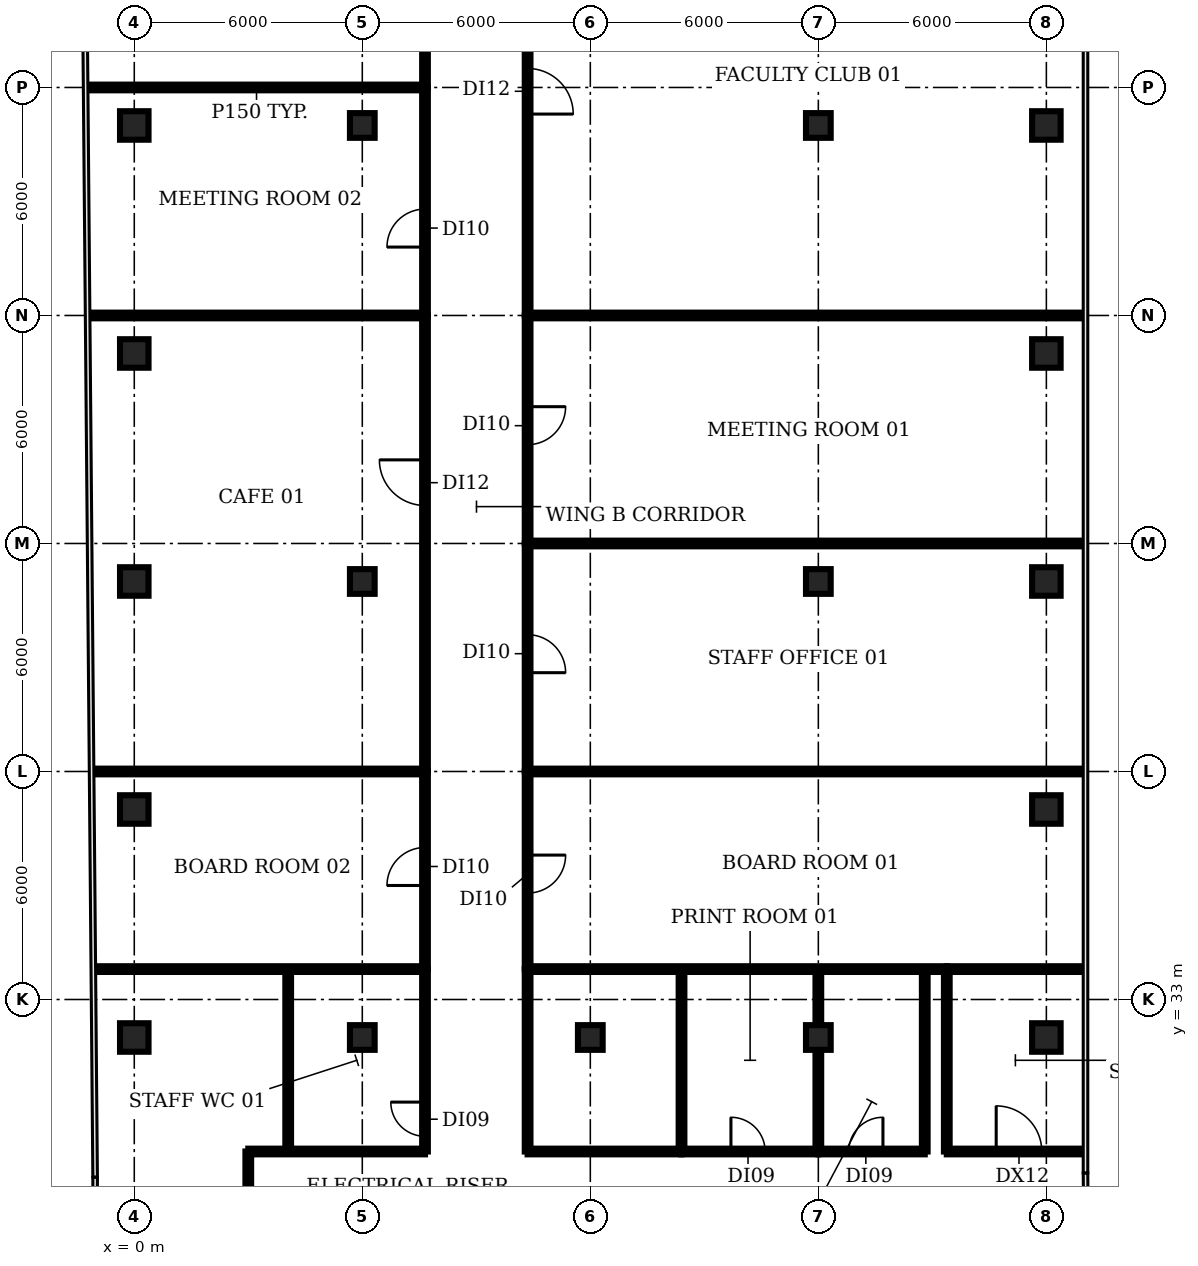
"""IFC4 building model, lengths in metres.
Left out: names, types, materials, properties, quantities, classifications, styles, units other than length and angle.
Written with IfcOpenShell. Run it as: python <this file> out.ifc"""

import sys

from ifc_helpers import new_model, si_unit, direction, frame, frame_2d, origin, origin_2d, place, context, subcontext, project, spatial, rectangle, extrude, element, fill, save


model = new_model("IFC4")
c1 = context("Model", 3, precision=1e-05, world=origin(), true_north=direction((0.0, 1.0)))
c2 = subcontext(c1, "Body", "Model", "MODEL_VIEW")
j1 = project(units=[si_unit("LENGTHUNIT", "METRE"), si_unit("PLANEANGLEUNIT", "RADIAN")], contexts=[c1])
p1 = place(None, origin())
s1 = spatial("IfcSite", under=j1, at=p1, CompositionType="ELEMENT")
p2 = place(p1, origin())
s2 = spatial("IfcBuilding", under=s1, at=p2, CompositionType="ELEMENT")
p3 = place(p2, frame((0.0, 0.0, 289.4)))
s3 = spatial("IfcBuildingStorey", under=s2, at=p3, CompositionType="ELEMENT", Elevation=289.4)
for number, where, z_axis, x_axis in (
    (1, (0.0, 32.0, 0.0), (0.0, 0.0, 1.0), (1.0, 0.0, 0.0)),
    (2, (0.0, 38.0, 0.0), (0.0, 0.0, 1.0), (1.0, 0.0, 0.0)),
    (3, (0.0, 44.0, 0.0), (0.0, 0.0, 1.0), (1.0, 0.0, 0.0)),
    (4, (0.0, 50.0, 0.0), (0.0, 0.0, 1.0), (1.0, 0.0, 0.0)),
    (5, (0.0, 56.0, 0.0), (0.0, 0.0, 1.0), (1.0, 0.0, 0.0)),
):
    element("IfcColumn", number, at=place(p3, frame(where, z_axis=z_axis, x_axis=x_axis)), inside=s3, PredefinedType="COLUMN", context=c2, shape_type="SweptSolid", body=[
        extrude(rectangle(XDim=0.75, YDim=0.75, at=origin_2d()), origin(), (0.0, 0.0, 1.0), 3.85),
    ])
for number, where, z_axis, x_axis in (
    (6, (6.0, 32.0, 0.0), (0.0, 0.0, 1.0), (1.0, 0.0, 0.0)),
    (7, (6.0, 44.0, 0.0), (0.0, 0.0, 1.0), (1.0, 0.0, 0.0)),
    (8, (6.0, 56.0, 0.0), (0.0, 0.0, 1.0), (1.0, 0.0, 0.0)),
    (9, (12.0, 32.0, 0.0), (0.0, 0.0, 1.0), (1.0, 0.0, 0.0)),
    (10, (18.0, 32.0, 0.0), (0.0, 0.0, 1.0), (1.0, 0.0, 0.0)),
    (11, (18.0, 44.0, 0.0), (0.0, 0.0, 1.0), (1.0, 0.0, 0.0)),
    (12, (18.0, 56.0, 0.0), (0.0, 0.0, 1.0), (1.0, 0.0, 0.0)),
):
    element("IfcColumn", number, at=place(p3, frame(where, z_axis=z_axis, x_axis=x_axis)), inside=s3, PredefinedType="COLUMN", context=c2, shape_type="SweptSolid", body=[
        extrude(rectangle(XDim=0.65, YDim=0.65, at=origin_2d()), origin(), (0.0, 0.0, 1.0), 3.85),
    ])
for number, where, z_axis, x_axis in (
    (13, (24.0, 32.0, 0.0), (0.0, 0.0, 1.0), (1.0, 0.0, 0.0)),
    (14, (24.0, 38.0, 0.0), (0.0, 0.0, 1.0), (1.0, 0.0, 0.0)),
    (15, (24.0, 44.0, 0.0), (0.0, 0.0, 1.0), (1.0, 0.0, 0.0)),
    (16, (24.0, 50.0, 0.0), (0.0, 0.0, 1.0), (1.0, 0.0, 0.0)),
    (17, (24.0, 56.0, 0.0), (0.0, 0.0, 1.0), (1.0, 0.0, 0.0)),
):
    element("IfcColumn", number, at=place(p3, frame(where, z_axis=z_axis, x_axis=x_axis)), inside=s3, PredefinedType="COLUMN", context=c2, shape_type="SweptSolid", body=[
        extrude(rectangle(XDim=0.75, YDim=0.75, at=origin_2d()), origin(), (0.0, 0.0, 1.0), 3.85),
    ])
p4 = place(p3, frame((-1.216, 57.0, 0.0), z_axis=(0.0, 0.0, 1.0), x_axis=(1.0, 0.0, 0.0)))
e18 = element("IfcWall", 18, at=p4, inside=s3, PredefinedType="PARTITIONING", context=c2, shape_type="SweptSolid", body=[
    extrude(rectangle(XDim=8.866, YDim=0.15, at=frame_2d((4.433, 0.0))), origin(), (0.0, 0.0, 1.0), 2.9),
])
p5 = place(p3, frame((-1.18, 51.0, 0.0), z_axis=(0.0, 0.0, 1.0), x_axis=(1.0, 0.0, 0.0)))
e19 = element("IfcWall", 19, at=p5, inside=s3, PredefinedType="PARTITIONING", context=c2, shape_type="SweptSolid", body=[
    extrude(rectangle(XDim=8.83, YDim=0.15, at=frame_2d((4.415, 0.0))), origin(), (0.0, 0.0, 1.0), 2.9),
])
p6 = place(p3, frame((-1.07, 39.0, 0.0), z_axis=(0.0, 0.0, 1.0), x_axis=(1.0, 0.0, 0.0)))
e20 = element("IfcWall", 20, at=p6, inside=s3, PredefinedType="PARTITIONING", context=c2, shape_type="SweptSolid", body=[
    extrude(rectangle(XDim=8.72, YDim=0.15, at=frame_2d((4.36, 0.0))), origin(), (0.0, 0.0, 1.0), 2.9),
])
p7 = place(p3, frame((-1.03, 33.8, 0.0), z_axis=(0.0, 0.0, 1.0), x_axis=(1.0, 0.0, 0.0)))
e21 = element("IfcWall", 21, at=p7, inside=s3, PredefinedType="PARTITIONING", context=c2, shape_type="SweptSolid", body=[
    extrude(rectangle(XDim=8.68, YDim=0.15, at=frame_2d((4.34, 0.0))), origin(), (0.0, 0.0, 1.0), 2.9),
])
p8 = place(p3, frame((3.0, 25.1, 0.0), z_axis=(0.0, 0.0, 1.0), x_axis=(0.0, 1.0, 0.0)))
e22 = element("IfcWall", 22, at=p8, inside=s3, PredefinedType="PARTITIONING", context=c2, shape_type="SweptSolid", body=[
    extrude(rectangle(XDim=3.9, YDim=0.15, at=frame_2d((1.95, 0.0))), origin(), (0.0, 0.0, 1.0), 2.9),
])
p9 = place(p3, frame((3.0, 29.0, 0.0), z_axis=(0.0, 0.0, 1.0), x_axis=(1.0, 0.0, 0.0)))
e23 = element("IfcWall", 23, at=p9, inside=s3, PredefinedType="PARTITIONING", context=c2, shape_type="SweptSolid", body=[
    extrude(rectangle(XDim=4.65, YDim=0.15, at=frame_2d((2.325, 0.0))), origin(), (0.0, 0.0, 1.0), 2.9),
])
p10 = place(p3, frame((4.05, 29.0, 0.0), z_axis=(0.0, 0.0, 1.0), x_axis=(0.0, 1.0, 0.0)))
e24 = element("IfcWall", 24, at=p10, inside=s3, PredefinedType="PARTITIONING", context=c2, shape_type="SweptSolid", body=[
    extrude(rectangle(XDim=4.8, YDim=0.15, at=frame_2d((2.4, 0.0))), origin(), (0.0, 0.0, 1.0), 2.9),
])
p11 = place(p3, frame((7.65, 29.0, 0.0), z_axis=(0.0, 0.0, 1.0), x_axis=(0.0, 1.0, 0.0)))
e25 = element("IfcWall", 25, at=p11, inside=s3, PredefinedType="PARTITIONING", context=c2, shape_type="SweptSolid", body=[
    extrude(rectangle(XDim=4.8, YDim=0.15, at=frame_2d((2.4, 0.0))), origin(), (0.0, 0.0, 1.0), 2.9),
])
p12 = place(p11, frame((0.4, 0.0, 0.0)))
e26 = element("IfcOpeningElement", 26, at=p12, cuts=e25, PredefinedType="OPENING", context=c2, shape_type="SweptSolid", body=[
    extrude(rectangle(XDim=0.9, YDim=2.1, at=frame_2d((0.45, 1.05))), frame((0.0, 0.085, 0.0), z_axis=(0.0, -1.0, 0.0), x_axis=(1.0, 0.0, 0.0)), (0.0, 0.0, 1.0), 0.17),
])
p13 = place(p3, frame((7.65, 33.8, 0.0), z_axis=(0.0, 0.0, 1.0), x_axis=(0.0, 1.0, 0.0)))
e27 = element("IfcWall", 27, at=p13, inside=s3, PredefinedType="PARTITIONING", context=c2, shape_type="SweptSolid", body=[
    extrude(rectangle(XDim=5.2, YDim=0.15, at=frame_2d((2.6, 0.0))), origin(), (0.0, 0.0, 1.0), 2.9),
])
p14 = place(p13, frame((2.2, 0.0, 0.0)))
e28 = element("IfcOpeningElement", 28, at=p14, cuts=e27, PredefinedType="OPENING", context=c2, shape_type="SweptSolid", body=[
    extrude(rectangle(XDim=1.0, YDim=2.1, at=frame_2d((0.5, 1.05))), frame((0.0, 0.085, 0.0), z_axis=(0.0, -1.0, 0.0), x_axis=(1.0, 0.0, 0.0)), (0.0, 0.0, 1.0), 0.17),
])
p15 = place(p3, frame((7.65, 39.0, 0.0), z_axis=(0.0, 0.0, 1.0), x_axis=(0.0, 1.0, 0.0)))
e29 = element("IfcWall", 29, at=p15, inside=s3, PredefinedType="PARTITIONING", context=c2, shape_type="SweptSolid", body=[
    extrude(rectangle(XDim=12.0, YDim=0.15, at=frame_2d((6.0, 0.0))), origin(), (0.0, 0.0, 1.0), 2.9),
])
p16 = place(p15, frame((7.0, 0.0, 0.0)))
e30 = element("IfcOpeningElement", 30, at=p16, cuts=e29, PredefinedType="OPENING", context=c2, shape_type="SweptSolid", body=[
    extrude(rectangle(XDim=1.2, YDim=2.1, at=frame_2d((0.6, 1.05))), frame((0.0, 0.085, 0.0), z_axis=(0.0, -1.0, 0.0), x_axis=(1.0, 0.0, 0.0)), (0.0, 0.0, 1.0), 0.17),
])
p17 = place(p3, frame((7.65, 51.0, 0.0), z_axis=(0.0, 0.0, 1.0), x_axis=(0.0, 1.0, 0.0)))
e31 = element("IfcWall", 31, at=p17, inside=s3, PredefinedType="PARTITIONING", context=c2, shape_type="SweptSolid", body=[
    extrude(rectangle(XDim=6.0, YDim=0.15, at=frame_2d((3.0, 0.0))), origin(), (0.0, 0.0, 1.0), 2.9),
])
p18 = place(p17, frame((1.8, 0.0, 0.0)))
e32 = element("IfcOpeningElement", 32, at=p18, cuts=e31, PredefinedType="OPENING", context=c2, shape_type="SweptSolid", body=[
    extrude(rectangle(XDim=1.0, YDim=2.1, at=frame_2d((0.5, 1.05))), frame((0.0, 0.085, 0.0), z_axis=(0.0, -1.0, 0.0), x_axis=(1.0, 0.0, 0.0)), (0.0, 0.0, 1.0), 0.17),
])
p19 = place(p3, frame((7.65, 57.0, 0.0), z_axis=(0.0, 0.0, 1.0), x_axis=(0.0, 1.0, 0.0)))
e33 = element("IfcWall", 33, at=p19, inside=s3, PredefinedType="PARTITIONING", context=c2, shape_type="SweptSolid", body=[
    extrude(rectangle(XDim=6.036, YDim=0.15, at=frame_2d((3.018, 0.0))), origin(), (0.0, 0.0, 1.0), 2.9),
])
p20 = place(p19, frame((1.83, 0.0, 0.0)))
e34 = element("IfcOpeningElement", 34, at=p20, cuts=e33, PredefinedType="OPENING", context=c2, shape_type="SweptSolid", body=[
    extrude(rectangle(XDim=1.2, YDim=2.1, at=frame_2d((0.6, 1.05))), frame((0.0, 0.085, 0.0), z_axis=(0.0, -1.0, 0.0), x_axis=(1.0, 0.0, 0.0)), (0.0, 0.0, 1.0), 0.17),
])
p21 = place(p3, frame((10.35, 29.0, 0.0), z_axis=(0.0, 0.0, 1.0), x_axis=(0.0, 1.0, 0.0)))
e35 = element("IfcWall", 35, at=p21, inside=s3, PredefinedType="PARTITIONING", context=c2, shape_type="SweptSolid", body=[
    extrude(rectangle(XDim=4.8, YDim=0.15, at=frame_2d((2.4, 0.0))), origin(), (0.0, 0.0, 1.0), 2.9),
])
p22 = place(p3, frame((10.35, 29.0, 0.0), z_axis=(0.0, 0.0, 1.0), x_axis=(1.0, 0.0, 0.0)))
e36 = element("IfcWall", 36, at=p22, inside=s3, PredefinedType="PARTITIONING", context=c2, shape_type="SweptSolid", body=[
    extrude(rectangle(XDim=4.05, YDim=0.15, at=frame_2d((2.025, 0.0))), origin(), (0.0, 0.0, 1.0), 2.9),
])
p23 = place(p3, frame((10.35, 33.8, 0.0), z_axis=(0.0, 0.0, 1.0), x_axis=(1.0, 0.0, 0.0)))
e37 = element("IfcWall", 37, at=p23, inside=s3, PredefinedType="PARTITIONING", context=c2, shape_type="SweptSolid", body=[
    extrude(rectangle(XDim=11.03, YDim=0.15, at=frame_2d((5.515, 0.0))), origin(), (0.0, 0.0, 1.0), 2.9),
])
p24 = place(p3, frame((10.35, 39.0, 0.0), z_axis=(0.0, 0.0, 1.0), x_axis=(0.0, -1.0, 0.0)))
e38 = element("IfcWall", 38, at=p24, inside=s3, PredefinedType="PARTITIONING", context=c2, shape_type="SweptSolid", body=[
    extrude(rectangle(XDim=5.2, YDim=0.15, at=frame_2d((2.6, 0.0))), origin(), (0.0, 0.0, 1.0), 2.9),
])
p25 = place(p24, frame((2.2, 0.0, 0.0)))
e39 = element("IfcOpeningElement", 39, at=p25, cuts=e38, PredefinedType="OPENING", context=c2, shape_type="SweptSolid", body=[
    extrude(rectangle(XDim=1.0, YDim=2.1, at=frame_2d((0.5, 1.05))), frame((0.0, 0.085, 0.0), z_axis=(0.0, -1.0, 0.0), x_axis=(1.0, 0.0, 0.0)), (0.0, 0.0, 1.0), 0.17),
])
p26 = place(p3, frame((10.35, 39.0, 0.0), z_axis=(0.0, 0.0, 1.0), x_axis=(1.0, 0.0, 0.0)))
e40 = element("IfcWall", 40, at=p26, inside=s3, PredefinedType="PARTITIONING", context=c2, shape_type="SweptSolid", body=[
    extrude(rectangle(XDim=14.63, YDim=0.15, at=frame_2d((7.315, 0.0))), origin(), (0.0, 0.0, 1.0), 2.9),
])
p27 = place(p3, frame((10.35, 45.0, 0.0), z_axis=(0.0, 0.0, 1.0), x_axis=(0.0, -1.0, 0.0)))
e41 = element("IfcWall", 41, at=p27, inside=s3, PredefinedType="PARTITIONING", context=c2, shape_type="SweptSolid", body=[
    extrude(rectangle(XDim=6.0, YDim=0.15, at=frame_2d((3.0, 0.0))), origin(), (0.0, 0.0, 1.0), 2.9),
])
p28 = place(p27, frame((2.4, 0.0, 0.0)))
e42 = element("IfcOpeningElement", 42, at=p28, cuts=e41, PredefinedType="OPENING", context=c2, shape_type="SweptSolid", body=[
    extrude(rectangle(XDim=1.0, YDim=2.1, at=frame_2d((0.5, 1.05))), frame((0.0, 0.085, 0.0), z_axis=(0.0, -1.0, 0.0), x_axis=(1.0, 0.0, 0.0)), (0.0, 0.0, 1.0), 0.17),
])
p29 = place(p3, frame((10.35, 45.0, 0.0), z_axis=(0.0, 0.0, 1.0), x_axis=(1.0, 0.0, 0.0)))
e43 = element("IfcWall", 43, at=p29, inside=s3, PredefinedType="PARTITIONING", context=c2, shape_type="SweptSolid", body=[
    extrude(rectangle(XDim=14.63, YDim=0.15, at=frame_2d((7.315, 0.0))), origin(), (0.0, 0.0, 1.0), 2.9),
])
p30 = place(p3, frame((10.35, 51.0, 0.0), z_axis=(0.0, 0.0, 1.0), x_axis=(0.0, -1.0, 0.0)))
e44 = element("IfcWall", 44, at=p30, inside=s3, PredefinedType="PARTITIONING", context=c2, shape_type="SweptSolid", body=[
    extrude(rectangle(XDim=6.0, YDim=0.15, at=frame_2d((3.0, 0.0))), origin(), (0.0, 0.0, 1.0), 2.9),
])
p31 = place(p30, frame((2.4, 0.0, 0.0)))
e45 = element("IfcOpeningElement", 45, at=p31, cuts=e44, PredefinedType="OPENING", context=c2, shape_type="SweptSolid", body=[
    extrude(rectangle(XDim=1.0, YDim=2.1, at=frame_2d((0.5, 1.05))), frame((0.0, 0.085, 0.0), z_axis=(0.0, -1.0, 0.0), x_axis=(1.0, 0.0, 0.0)), (0.0, 0.0, 1.0), 0.17),
])
p32 = place(p3, frame((10.35, 51.0, 0.0), z_axis=(0.0, 0.0, 1.0), x_axis=(1.0, 0.0, 0.0)))
e46 = element("IfcWall", 46, at=p32, inside=s3, PredefinedType="PARTITIONING", context=c2, shape_type="SweptSolid", body=[
    extrude(rectangle(XDim=14.63, YDim=0.15, at=frame_2d((7.315, 0.0))), origin(), (0.0, 0.0, 1.0), 2.9),
])
p33 = place(p3, frame((10.35, 63.06, 0.0), z_axis=(0.0, 0.0, 1.0), x_axis=(0.0, -1.0, 0.0)))
e47 = element("IfcWall", 47, at=p33, inside=s3, PredefinedType="PARTITIONING", context=c2, shape_type="SweptSolid", body=[
    extrude(rectangle(XDim=12.06, YDim=0.15, at=frame_2d((6.03, 0.0))), origin(), (0.0, 0.0, 1.0), 2.9),
])
p34 = place(p33, frame((5.56, 0.0, 0.0)))
e48 = element("IfcOpeningElement", 48, at=p34, cuts=e47, PredefinedType="OPENING", context=c2, shape_type="SweptSolid", body=[
    extrude(rectangle(XDim=1.2, YDim=2.1, at=frame_2d((0.6, 1.05))), frame((0.0, 0.085, 0.0), z_axis=(0.0, -1.0, 0.0), x_axis=(1.0, 0.0, 0.0)), (0.0, 0.0, 1.0), 0.17),
])
p35 = place(p3, frame((14.4, 29.0, 0.0), z_axis=(0.0, 0.0, 1.0), x_axis=(0.0, 1.0, 0.0)))
e49 = element("IfcWall", 49, at=p35, inside=s3, PredefinedType="PARTITIONING", context=c2, shape_type="SweptSolid", body=[
    extrude(rectangle(XDim=4.8, YDim=0.15, at=frame_2d((2.4, 0.0))), origin(), (0.0, 0.0, 1.0), 2.9),
])
p36 = place(p3, frame((14.4, 29.0, 0.0), z_axis=(0.0, 0.0, 1.0), x_axis=(1.0, 0.0, 0.0)))
e50 = element("IfcWall", 50, at=p36, inside=s3, PredefinedType="PARTITIONING", context=c2, shape_type="SweptSolid", body=[
    extrude(rectangle(XDim=3.6, YDim=0.15, at=frame_2d((1.8, 0.0))), origin(), (0.0, 0.0, 1.0), 2.9),
])
p37 = place(p36, frame((1.3, 0.0, 0.0)))
e51 = element("IfcOpeningElement", 51, at=p37, cuts=e50, PredefinedType="OPENING", context=c2, shape_type="SweptSolid", body=[
    extrude(rectangle(XDim=0.9, YDim=2.1, at=frame_2d((0.45, 1.05))), frame((0.0, 0.085, 0.0), z_axis=(0.0, -1.0, 0.0), x_axis=(1.0, 0.0, 0.0)), (0.0, 0.0, 1.0), 0.17),
])
p38 = place(p3, frame((18.0, 29.0, 0.0), z_axis=(0.0, 0.0, 1.0), x_axis=(0.0, 1.0, 0.0)))
e52 = element("IfcWall", 52, at=p38, inside=s3, PredefinedType="PARTITIONING", context=c2, shape_type="SweptSolid", body=[
    extrude(rectangle(XDim=4.8, YDim=0.15, at=frame_2d((2.4, 0.0))), origin(), (0.0, 0.0, 1.0), 2.9),
])
p39 = place(p3, frame((18.0, 29.0, 0.0), z_axis=(0.0, 0.0, 1.0), x_axis=(1.0, 0.0, 0.0)))
e53 = element("IfcWall", 53, at=p39, inside=s3, PredefinedType="PARTITIONING", context=c2, shape_type="SweptSolid", body=[
    extrude(rectangle(XDim=2.8, YDim=0.15, at=frame_2d((1.4, 0.0))), origin(), (0.0, 0.0, 1.0), 2.9),
])
p40 = place(p39, frame((0.8, 0.0, 0.0)))
e54 = element("IfcOpeningElement", 54, at=p40, cuts=e53, PredefinedType="OPENING", context=c2, shape_type="SweptSolid", body=[
    extrude(rectangle(XDim=0.9, YDim=2.1, at=frame_2d((0.45, 1.05))), frame((0.0, 0.085, 0.0), z_axis=(0.0, -1.0, 0.0), x_axis=(1.0, 0.0, 0.0)), (0.0, 0.0, 1.0), 0.17),
])
for number, where, z_axis, x_axis in (
    (55, (20.8, 29.0, 0.0), (0.0, 0.0, 1.0), (0.0, 1.0, 0.0)),
    (56, (21.38, 29.0, 0.0), (0.0, 0.0, 1.0), (0.0, 1.0, 0.0)),
):
    element("IfcWall", number, at=place(p3, frame(where, z_axis=z_axis, x_axis=x_axis)), inside=s3, PredefinedType="PARTITIONING", context=c2, shape_type="SweptSolid", body=[
        extrude(rectangle(XDim=4.8, YDim=0.15, at=frame_2d((2.4, 0.0))), origin(), (0.0, 0.0, 1.0), 2.9),
    ])
p41 = place(p3, frame((21.38, 29.0, 0.0), z_axis=(0.0, 0.0, 1.0), x_axis=(1.0, 0.0, 0.0)))
e57 = element("IfcWall", 57, at=p41, inside=s3, PredefinedType="PARTITIONING", context=c2, shape_type="SweptSolid", body=[
    extrude(rectangle(XDim=3.6, YDim=0.15, at=frame_2d((1.8, 0.0))), origin(), (0.0, 0.0, 1.0), 2.9),
])
p42 = place(p41, frame((1.3, 0.0, 0.0)))
e58 = element("IfcOpeningElement", 58, at=p42, cuts=e57, PredefinedType="OPENING", context=c2, shape_type="SweptSolid", body=[
    extrude(rectangle(XDim=1.2, YDim=2.1, at=frame_2d((0.6, 1.05))), frame((0.0, 0.085, 0.0), z_axis=(0.0, -1.0, 0.0), x_axis=(1.0, 0.0, 0.0)), (0.0, 0.0, 1.0), 0.17),
])
p43 = place(p3, frame((21.38, 33.8, 0.0), z_axis=(0.0, 0.0, 1.0), x_axis=(1.0, 0.0, 0.0)))
e59 = element("IfcWall", 59, at=p43, inside=s3, PredefinedType="PARTITIONING", context=c2, shape_type="SweptSolid", body=[
    extrude(rectangle(XDim=3.6, YDim=0.15, at=frame_2d((1.8, 0.0))), origin(), (0.0, 0.0, 1.0), 2.9),
])
p44 = place(p12, origin())
e60 = element("IfcDoor", 60, at=p44, inside=s3, OperationType="SINGLE_SWING_RIGHT", PredefinedType="DOOR", context=c2, shape_type="SweptSolid", body=[
    extrude(rectangle(XDim=0.9, YDim=2.1, at=frame_2d((0.45, 1.05))), frame((0.0, 0.025, 0.0), z_axis=(0.0, -1.0, 0.0), x_axis=(1.0, 0.0, 0.0)), (0.0, 0.0, 1.0), 0.05),
])
fill(e26, e60)
p45 = place(p14, origin())
e61 = element("IfcDoor", 61, at=p45, inside=s3, OperationType="SINGLE_SWING_LEFT", PredefinedType="DOOR", context=c2, shape_type="SweptSolid", body=[
    extrude(rectangle(XDim=1.0, YDim=2.1, at=frame_2d((0.5, 1.05))), frame((0.0, 0.025, 0.0), z_axis=(0.0, -1.0, 0.0), x_axis=(1.0, 0.0, 0.0)), (0.0, 0.0, 1.0), 0.05),
])
fill(e28, e61)
p46 = place(p16, origin())
e62 = element("IfcDoor", 62, at=p46, inside=s3, OperationType="SINGLE_SWING_RIGHT", PredefinedType="DOOR", context=c2, shape_type="SweptSolid", body=[
    extrude(rectangle(XDim=1.2, YDim=2.1, at=frame_2d((0.6, 1.05))), frame((0.0, 0.025, 0.0), z_axis=(0.0, -1.0, 0.0), x_axis=(1.0, 0.0, 0.0)), (0.0, 0.0, 1.0), 0.05),
])
fill(e30, e62)
p47 = place(p18, origin())
e63 = element("IfcDoor", 63, at=p47, inside=s3, OperationType="SINGLE_SWING_LEFT", PredefinedType="DOOR", context=c2, shape_type="SweptSolid", body=[
    extrude(rectangle(XDim=1.0, YDim=2.1, at=frame_2d((0.5, 1.05))), frame((0.0, 0.025, 0.0), z_axis=(0.0, -1.0, 0.0), x_axis=(1.0, 0.0, 0.0)), (0.0, 0.0, 1.0), 0.05),
])
fill(e32, e63)
p48 = place(p25, origin())
e64 = element("IfcDoor", 64, at=p48, inside=s3, OperationType="SINGLE_SWING_LEFT", PredefinedType="DOOR", context=c2, shape_type="SweptSolid", body=[
    extrude(rectangle(XDim=1.0, YDim=2.1, at=frame_2d((0.5, 1.05))), frame((0.0, 0.025, 0.0), z_axis=(0.0, -1.0, 0.0), x_axis=(1.0, 0.0, 0.0)), (0.0, 0.0, 1.0), 0.05),
])
fill(e39, e64)
p49 = place(p28, origin())
e65 = element("IfcDoor", 65, at=p49, inside=s3, OperationType="SINGLE_SWING_RIGHT", PredefinedType="DOOR", context=c2, shape_type="SweptSolid", body=[
    extrude(rectangle(XDim=1.0, YDim=2.1, at=frame_2d((0.5, 1.05))), frame((0.0, 0.025, 0.0), z_axis=(0.0, -1.0, 0.0), x_axis=(1.0, 0.0, 0.0)), (0.0, 0.0, 1.0), 0.05),
])
fill(e42, e65)
p50 = place(p31, origin())
e66 = element("IfcDoor", 66, at=p50, inside=s3, OperationType="SINGLE_SWING_LEFT", PredefinedType="DOOR", context=c2, shape_type="SweptSolid", body=[
    extrude(rectangle(XDim=1.0, YDim=2.1, at=frame_2d((0.5, 1.05))), frame((0.0, 0.025, 0.0), z_axis=(0.0, -1.0, 0.0), x_axis=(1.0, 0.0, 0.0)), (0.0, 0.0, 1.0), 0.05),
])
fill(e45, e66)
p51 = place(p34, origin())
e67 = element("IfcDoor", 67, at=p51, inside=s3, OperationType="SINGLE_SWING_RIGHT", PredefinedType="DOOR", context=c2, shape_type="SweptSolid", body=[
    extrude(rectangle(XDim=1.2, YDim=2.1, at=frame_2d((0.6, 1.05))), frame((0.0, 0.025, 0.0), z_axis=(0.0, -1.0, 0.0), x_axis=(1.0, 0.0, 0.0)), (0.0, 0.0, 1.0), 0.05),
])
fill(e48, e67)
p52 = place(p37, origin())
e68 = element("IfcDoor", 68, at=p52, inside=s3, OperationType="SINGLE_SWING_LEFT", PredefinedType="DOOR", context=c2, shape_type="SweptSolid", body=[
    extrude(rectangle(XDim=0.9, YDim=2.1, at=frame_2d((0.45, 1.05))), frame((0.0, 0.025, 0.0), z_axis=(0.0, -1.0, 0.0), x_axis=(1.0, 0.0, 0.0)), (0.0, 0.0, 1.0), 0.05),
])
fill(e51, e68)
p53 = place(p40, origin())
e69 = element("IfcDoor", 69, at=p53, inside=s3, OperationType="SINGLE_SWING_RIGHT", PredefinedType="DOOR", context=c2, shape_type="SweptSolid", body=[
    extrude(rectangle(XDim=0.9, YDim=2.1, at=frame_2d((0.45, 1.05))), frame((0.0, 0.025, 0.0), z_axis=(0.0, -1.0, 0.0), x_axis=(1.0, 0.0, 0.0)), (0.0, 0.0, 1.0), 0.05),
])
fill(e54, e69)
p54 = place(p42, origin())
e70 = element("IfcDoor", 70, at=p54, inside=s3, OperationType="SINGLE_SWING_LEFT", PredefinedType="DOOR", context=c2, shape_type="SweptSolid", body=[
    extrude(rectangle(XDim=1.2, YDim=2.1, at=frame_2d((0.6, 1.05))), frame((0.0, 0.025, 0.0), z_axis=(0.0, -1.0, 0.0), x_axis=(1.0, 0.0, 0.0)), (0.0, 0.0, 1.0), 0.05),
])
fill(e58, e70)
save(model, sys.argv[1])
